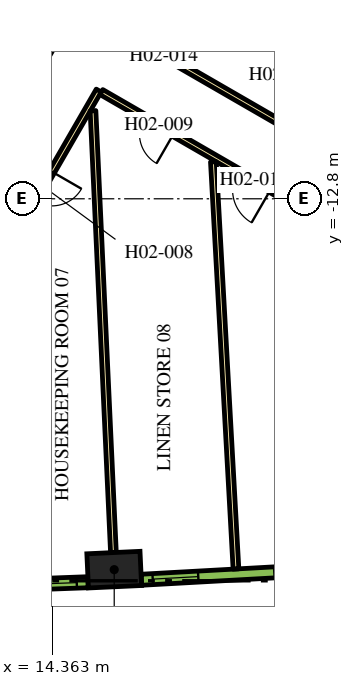
"""IFC4 building model, lengths in metres.
Left out: names, types, materials, properties, quantities, classifications, styles, units other than length and angle.
Written with IfcOpenShell. Run it as: python <this file> out.ifc"""

import sys

from ifc_helpers import new_model, si_unit, direction, frame, frame_2d, origin, origin_2d, place, context, subcontext, project, spatial, rectangle, extrude, element, fill, save


model = new_model("IFC4")
c1 = context("Model", 3, precision=1e-05, world=origin(), true_north=direction((0.0, 1.0)))
c2 = subcontext(c1, "Body", "Model", "MODEL_VIEW")
j1 = project(units=[si_unit("LENGTHUNIT", "METRE"), si_unit("PLANEANGLEUNIT", "RADIAN")], contexts=[c1])
p1 = place(None, origin())
s1 = spatial("IfcSite", under=j1, at=p1, CompositionType="ELEMENT")
p2 = place(p1, origin())
s2 = spatial("IfcBuilding", under=s1, at=p2, CompositionType="ELEMENT")
p3 = place(p2, frame((0.0, 0.0, 43.2)))
s3 = spatial("IfcBuildingStorey", under=s2, at=p3, CompositionType="ELEMENT", Elevation=43.2)
p4 = place(p3, frame((15.994, -22.558, 0.0), z_axis=(0.0, 0.0, 1.0), x_axis=(0.998932216029, 0.04619986774, 0.0)))
e1 = element("IfcColumn", 1, at=p4, inside=s3, PredefinedType="COLUMN", context=c2, shape_type="SweptSolid", body=[
    extrude(rectangle(XDim=1.4, YDim=0.9, at=origin_2d()), origin(), (0.0, 0.0, 1.0), 3.9),
])
p5 = place(p3, frame((11.943, -12.214, 0.0), z_axis=(0.0, 0.0, 1.0), x_axis=(0.49998092645, 0.866036415623, 0.0)))
e2 = element("IfcWall", 2, at=p5, inside=s3, PredefinedType="SOLIDWALL", context=c2, shape_type="SweptSolid", body=[
    extrude(rectangle(XDim=8.83, YDim=0.9, at=frame_2d((4.415, 0.0))), origin(), (0.0, 0.0, 1.0), 3.9),
])
p6 = place(p3, frame((12.885, -9.431, 0.0), z_axis=(0.0, 0.0, 1.0), x_axis=(0.500020560727, 0.866013532718, 0.0)))
e3 = element("IfcWall", 3, at=p6, inside=s3, PredefinedType="SOLIDWALL", context=c2, shape_type="SweptSolid", body=[
    extrude(rectangle(XDim=3.45, YDim=0.25, at=frame_2d((1.725, 0.0))), origin(), (0.0, 0.0, 1.0), 3.9),
])
p7 = place(p3, frame((16.412, -8.523, 0.0), z_axis=(0.0, 0.0, 1.0), x_axis=(0.866022197818, -0.500005552856, 0.0)))
e4 = element("IfcWall", 4, at=p7, inside=s3, PredefinedType="PARTITIONING", context=c2, shape_type="SweptSolid", body=[
    extrude(rectangle(XDim=16.224, YDim=0.15, at=frame_2d((8.112, 0.0))), origin(), (0.0, 0.0, 1.0), 2.75),
])
p8 = place(p7, frame((7.949, 0.0, 0.0)))
e5 = element("IfcOpeningElement", 5, at=p8, cuts=e4, PredefinedType="OPENING", context=c2, shape_type="SweptSolid", body=[
    extrude(rectangle(XDim=1.0, YDim=2.1, at=frame_2d((0.5, 1.05))), frame((0.0, 0.085, 0.0), z_axis=(0.0, -1.0, 0.0), x_axis=(1.0, 0.0, 0.0)), (0.0, 0.0, 1.0), 0.17),
])
p9 = place(p7, frame((0.526, 0.0, 0.0)))
e6 = element("IfcOpeningElement", 6, at=p9, cuts=e4, PredefinedType="OPENING", context=c2, shape_type="SweptSolid", body=[
    extrude(rectangle(XDim=1.0, YDim=2.1, at=frame_2d((0.5, 1.05))), frame((0.0, 0.085, 0.0), z_axis=(0.0, -1.0, 0.0), x_axis=(1.0, 0.0, 0.0)), (0.0, 0.0, 1.0), 0.17),
])
p10 = place(p3, frame((15.587, -9.952, 0.0), z_axis=(0.0, 0.0, 1.0), x_axis=(-0.500016618951, -0.866015808616, 0.0)))
e7 = element("IfcWall", 7, at=p10, inside=s3, PredefinedType="PARTITIONING", context=c2, shape_type="SweptSolid", body=[
    extrude(rectangle(XDim=5.268, YDim=0.15, at=frame_2d((2.634, 0.0))), origin(), (0.0, 0.0, 1.0), 2.75),
])
p11 = place(p10, frame((2.465, 0.0, 0.0)))
e8 = element("IfcOpeningElement", 8, at=p11, cuts=e7, PredefinedType="OPENING", context=c2, shape_type="SweptSolid", body=[
    extrude(rectangle(XDim=0.9, YDim=2.1, at=frame_2d((0.45, 1.05))), frame((0.0, 0.085, 0.0), z_axis=(0.0, -1.0, 0.0), x_axis=(1.0, 0.0, 0.0)), (0.0, 0.0, 1.0), 0.17),
])
p12 = place(p3, frame((29.638, -18.064, 0.0), z_axis=(0.0, 0.0, 1.0), x_axis=(-0.866026175601, 0.499998663172, 0.0)))
e9 = element("IfcWall", 9, at=p12, inside=s3, PredefinedType="PARTITIONING", context=c2, shape_type="SweptSolid", body=[
    extrude(rectangle(XDim=16.144, YDim=0.15, at=frame_2d((8.072, 0.0))), origin(), (0.0, 0.0, 1.0), 2.75),
])
p13 = place(p12, frame((13.948, 0.0, 0.0)))
e10 = element("IfcOpeningElement", 10, at=p13, cuts=e9, PredefinedType="OPENING", context=c2, shape_type="SweptSolid", body=[
    extrude(rectangle(XDim=0.9, YDim=2.1, at=frame_2d((0.45, 1.05))), frame((0.0, 0.085, 0.0), z_axis=(0.0, -1.0, 0.0), x_axis=(1.0, 0.0, 0.0)), (0.0, 0.0, 1.0), 0.17),
])
p14 = place(p12, frame((11.004, 0.0, 0.0)))
e11 = element("IfcOpeningElement", 11, at=p14, cuts=e9, PredefinedType="OPENING", context=c2, shape_type="SweptSolid", body=[
    extrude(rectangle(XDim=1.0, YDim=2.1, at=frame_2d((0.5, 1.05))), frame((0.0, 0.085, 0.0), z_axis=(0.0, -1.0, 0.0), x_axis=(1.0, 0.0, 0.0)), (0.0, 0.0, 1.0), 0.17),
])
p15 = place(p3, frame((15.973, -22.109, 0.0), z_axis=(0.0, 0.0, 1.0), x_axis=(-0.046191717129, 0.998932592955, 0.0)))
e12 = element("IfcWall", 12, at=p15, inside=s3, PredefinedType="PARTITIONING", context=c2, shape_type="SweptSolid", body=[
    extrude(rectangle(XDim=11.638, YDim=0.15, at=frame_2d((5.819, 0.0))), origin(), (0.0, 0.0, 1.0), 2.75),
])
p16 = place(p3, frame((19.198, -22.541, 0.0), z_axis=(0.0, 0.0, 1.0), x_axis=(-0.055432210572, 0.99846245299, 0.0)))
e13 = element("IfcWall", 13, at=p16, inside=s3, PredefinedType="PARTITIONING", context=c2, shape_type="SweptSolid", body=[
    extrude(rectangle(XDim=10.729, YDim=0.15, at=frame_2d((5.365, 0.0))), origin(), (0.0, 0.0, 1.0), 2.75),
])
p17 = place(p3, frame((10.31, -23.074, 0.0), z_axis=(0.0, 0.0, 1.0), x_axis=(0.999317974969, 0.036926750529, 0.0)))
e14 = element("IfcWall", 14, at=p17, inside=s3, PredefinedType="SOLIDWALL", context=c2, shape_type="SweptSolid", body=[
    extrude(rectangle(XDim=4.998, YDim=0.29, at=frame_2d((2.499, 0.0))), origin(), (0.0, 0.0, 1.0), 3.65),
])
p18 = place(p17, frame((0.297, 0.0, 0.9)))
e15 = element("IfcOpeningElement", 15, at=p18, cuts=e14, PredefinedType="OPENING", context=c2, shape_type="SweptSolid", body=[
    extrude(rectangle(XDim=1.2, YDim=2.15, at=frame_2d((0.6, 1.075))), frame((0.0, 0.155, 0.0), z_axis=(0.0, -1.0, 0.0), x_axis=(1.0, 0.0, 0.0)), (0.0, 0.0, 1.0), 0.31),
])
p19 = place(p17, frame((3.501, 0.0, 0.9)))
e16 = element("IfcOpeningElement", 16, at=p19, cuts=e14, PredefinedType="OPENING", context=c2, shape_type="SweptSolid", body=[
    extrude(rectangle(XDim=1.2, YDim=2.15, at=frame_2d((0.6, 1.075))), frame((0.0, 0.155, 0.0), z_axis=(0.0, -1.0, 0.0), x_axis=(1.0, 0.0, 0.0)), (0.0, 0.0, 1.0), 0.31),
])
p20 = place(p3, frame((16.711, -22.824, 0.0), z_axis=(0.0, 0.0, 1.0), x_axis=(0.998464708705, 0.055391564976, 0.0)))
e17 = element("IfcWall", 17, at=p20, inside=s3, PredefinedType="SOLIDWALL", context=c2, shape_type="SweptSolid", body=[
    extrude(rectangle(XDim=4.998, YDim=0.29, at=frame_2d((2.499, 0.0))), origin(), (0.0, 0.0, 1.0), 3.65),
])
p21 = place(p20, frame((0.297, 0.0, 0.9)))
e18 = element("IfcOpeningElement", 18, at=p21, cuts=e17, PredefinedType="OPENING", context=c2, shape_type="SweptSolid", body=[
    extrude(rectangle(XDim=1.2, YDim=2.15, at=frame_2d((0.6, 1.075))), frame((0.0, 0.155, 0.0), z_axis=(0.0, -1.0, 0.0), x_axis=(1.0, 0.0, 0.0)), (0.0, 0.0, 1.0), 0.31),
])
p22 = place(p20, frame((3.501, 0.0, 0.9)))
e19 = element("IfcOpeningElement", 19, at=p22, cuts=e17, PredefinedType="OPENING", context=c2, shape_type="SweptSolid", body=[
    extrude(rectangle(XDim=1.2, YDim=2.15, at=frame_2d((0.6, 1.075))), frame((0.0, 0.155, 0.0), z_axis=(0.0, -1.0, 0.0), x_axis=(1.0, 0.0, 0.0)), (0.0, 0.0, 1.0), 0.31),
])
p23 = place(p11, origin())
e20 = element("IfcDoor", 20, at=p23, inside=s3, OperationType="SINGLE_SWING_LEFT", PredefinedType="DOOR", context=c2, shape_type="SweptSolid", body=[
    extrude(rectangle(XDim=0.9, YDim=2.1, at=frame_2d((0.45, 1.05))), frame((0.0, 0.025, 0.0), z_axis=(0.0, -1.0, 0.0), x_axis=(1.0, 0.0, 0.0)), (0.0, 0.0, 1.0), 0.05),
])
fill(e8, e20)
p24 = place(p13, origin())
e21 = element("IfcDoor", 21, at=p24, inside=s3, OperationType="SINGLE_SWING_RIGHT", PredefinedType="DOOR", context=c2, shape_type="SweptSolid", body=[
    extrude(rectangle(XDim=0.9, YDim=2.1, at=frame_2d((0.45, 1.05))), frame((0.0, 0.025, 0.0), z_axis=(0.0, -1.0, 0.0), x_axis=(1.0, 0.0, 0.0)), (0.0, 0.0, 1.0), 0.05),
])
fill(e10, e21)
p25 = place(p14, origin())
e22 = element("IfcDoor", 22, at=p25, inside=s3, OperationType="SINGLE_SWING_RIGHT", PredefinedType="DOOR", context=c2, shape_type="SweptSolid", body=[
    extrude(rectangle(XDim=1.0, YDim=2.1, at=frame_2d((0.5, 1.05))), frame((0.0, 0.025, 0.0), z_axis=(0.0, -1.0, 0.0), x_axis=(1.0, 0.0, 0.0)), (0.0, 0.0, 1.0), 0.05),
])
fill(e11, e22)
p26 = place(p9, origin())
e23 = element("IfcDoor", 23, at=p26, inside=s3, OperationType="SINGLE_SWING_LEFT", PredefinedType="DOOR", context=c2, shape_type="SweptSolid", body=[
    extrude(rectangle(XDim=1.0, YDim=2.1, at=frame_2d((0.5, 1.05))), frame((0.0, 0.025, 0.0), z_axis=(0.0, -1.0, 0.0), x_axis=(1.0, 0.0, 0.0)), (0.0, 0.0, 1.0), 0.05),
])
fill(e6, e23)
p27 = place(p19, origin())
e24 = element("IfcWindow", 24, at=p27, inside=s3, PartitioningType="DOUBLE_PANEL_VERTICAL", PredefinedType="WINDOW", context=c2, shape_type="SweptSolid", body=[
    extrude(rectangle(XDim=1.2, YDim=2.15, at=frame_2d((0.6, 1.075))), frame((0.0, 0.015, 0.0), z_axis=(0.0, -1.0, 0.0), x_axis=(1.0, 0.0, 0.0)), (0.0, 0.0, 1.0), 0.06),
])
fill(e16, e24)
p28 = place(p21, origin())
e25 = element("IfcWindow", 25, at=p28, inside=s3, PartitioningType="DOUBLE_PANEL_VERTICAL", PredefinedType="WINDOW", context=c2, shape_type="SweptSolid", body=[
    extrude(rectangle(XDim=1.2, YDim=2.15, at=frame_2d((0.6, 1.075))), frame((0.0, 0.015, 0.0), z_axis=(0.0, -1.0, 0.0), x_axis=(1.0, 0.0, 0.0)), (0.0, 0.0, 1.0), 0.06),
])
fill(e18, e25)
save(model, sys.argv[1])
